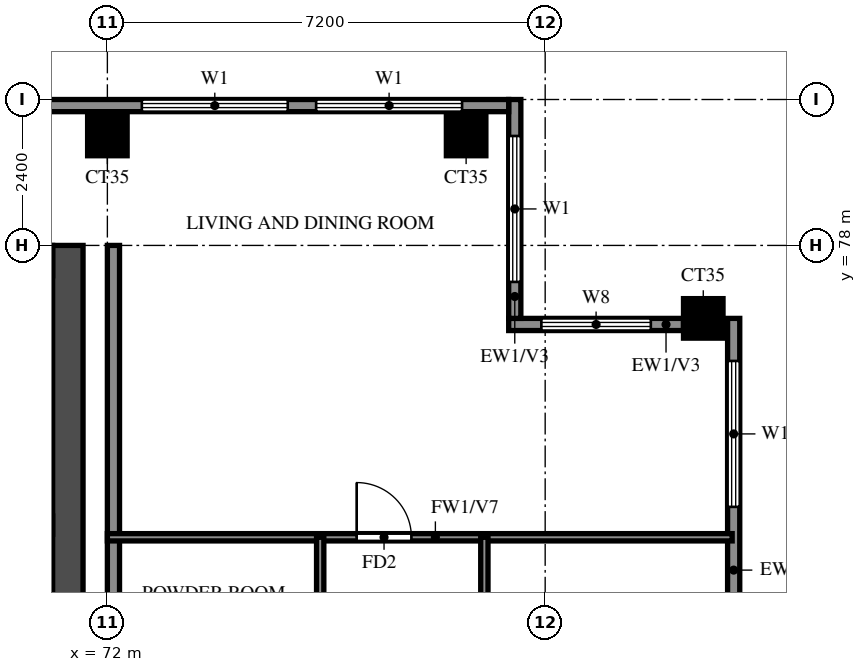
"""IFC4 building model, lengths in metres.
Left out: names, types, materials, properties, quantities, classifications, styles, units other than length and angle.
Written with IfcOpenShell. Run it as: python <this file> out.ifc"""

import sys

from ifc_helpers import new_model, si_unit, direction, frame, frame_2d, origin, origin_2d, place, context, subcontext, project, spatial, rectangle, extrude, source, transform, mapped, element, fill, save


model = new_model("IFC4")
c1 = context("Model", 3, precision=1e-05, world=origin(), true_north=direction((0.0, 1.0)))
c2 = subcontext(c1, "Body", "Model", "MODEL_VIEW")
j1 = project(units=[si_unit("LENGTHUNIT", "METRE"), si_unit("PLANEANGLEUNIT", "RADIAN")], contexts=[c1])
p1 = place(None, origin())
s1 = spatial("IfcSite", under=j1, at=p1, CompositionType="ELEMENT")
p2 = place(p1, origin())
s2 = spatial("IfcBuilding", under=s1, at=p2, CompositionType="ELEMENT")
p3 = place(p2, frame((0.0, 0.0, 250.0)))
s3 = spatial("IfcBuildingStorey", under=s2, at=p3, CompositionType="ELEMENT", Elevation=250.0)
m1 = source(origin(), c2, "Body", "SweptSolid", [
    extrude(rectangle(XDim=0.65, YDim=0.65, at=origin_2d()), origin(), (0.0, 0.0, 1.0), 3.22),
])
for number, where, z_axis, x_axis in (
    (1, (81.8, 76.8, 0.0), (0.0, 0.0, 1.0), (1.0, 0.0, 0.0)),
    (2, (72.0, 79.8, 0.0), (0.0, 0.0, 1.0), (1.0, 0.0, 0.0)),
    (3, (77.9, 79.8, 0.0), (0.0, 0.0, 1.0), (1.0, 0.0, 0.0)),
):
    element("IfcColumn", number, at=place(p3, frame(where, z_axis=z_axis, x_axis=x_axis)), inside=s3, PredefinedType="COLUMN", context=c2, shape_type="MappedRepresentation", body=[
        mapped(m1, transform((0.0, 0.0, 0.0))),
    ])
p4 = place(p3, frame((71.35, 66.15, 0.0), z_axis=(0.0, 0.0, 1.0), x_axis=(0.0, 1.0, 0.0)))
e4 = element("IfcWall", 4, at=p4, inside=s3, PredefinedType="SHEAR", context=c2, shape_type="SweptSolid", body=[
    extrude(rectangle(XDim=11.85, YDim=0.5, at=frame_2d((5.925, 0.0))), origin(), (0.0, 0.0, 1.0), 3.22),
])
p5 = place(p3, frame((29.7, 77.75, 0.0), z_axis=(0.0, 0.0, 1.0), x_axis=(1.0, 0.0, 0.0)))
e5 = element("IfcWall", 5, at=p5, inside=s3, PredefinedType="SHEAR", context=c2, shape_type="SweptSolid", body=[
    extrude(rectangle(XDim=41.4, YDim=0.5, at=frame_2d((20.7, 0.0))), origin(), (0.0, 0.0, 1.0), 3.22),
])
p6 = place(p3, frame((82.3, 69.6, 0.0), z_axis=(0.0, 0.0, 1.0), x_axis=(0.0, 1.0, 0.0)))
e6 = element("IfcWall", 6, at=p6, inside=s3, PredefinedType="SOLIDWALL", context=c2, shape_type="SweptSolid", body=[
    extrude(rectangle(XDim=7.2, YDim=0.2, at=frame_2d((3.6, 0.0))), origin(), (0.0, 0.0, 1.0), 3.22),
])
p7 = place(p6, frame((1.45, 0.0, 1.5)))
e7 = element("IfcOpeningElement", 7, at=p7, cuts=e6, PredefinedType="OPENING", context=c2, shape_type="SweptSolid", body=[
    extrude(rectangle(XDim=0.9, YDim=0.9, at=frame_2d((0.45, 0.45))), frame((0.0, 0.11, 0.0), z_axis=(0.0, -1.0, 0.0), x_axis=(1.0, 0.0, 0.0)), (0.0, 0.0, 1.0), 0.22),
])
p8 = place(p6, frame((4.1, 0.0, 0.6)))
e8 = element("IfcOpeningElement", 8, at=p8, cuts=e6, PredefinedType="OPENING", context=c2, shape_type="SweptSolid", body=[
    extrude(rectangle(XDim=2.4, YDim=2.4, at=frame_2d((1.2, 1.2))), frame((0.0, 0.11, 0.0), z_axis=(0.0, -1.0, 0.0), x_axis=(1.0, 0.0, 0.0)), (0.0, 0.0, 1.0), 0.22),
])
p9 = place(p3, frame((81.475, 76.7, 0.0), z_axis=(0.0, 0.0, 1.0), x_axis=(-1.0, 0.0, 0.0)))
e9 = element("IfcWall", 9, at=p9, inside=s3, PredefinedType="SOLIDWALL", context=c2, shape_type="SweptSolid", body=[
    extrude(rectangle(XDim=2.875, YDim=0.2, at=frame_2d((1.438, 0.0))), origin(), (0.0, 0.0, 1.0), 3.22),
])
p10 = place(p9, frame((0.538, 0.0, 0.6)))
e10 = element("IfcOpeningElement", 10, at=p10, cuts=e9, PredefinedType="OPENING", context=c2, shape_type="SweptSolid", body=[
    extrude(rectangle(XDim=1.8, YDim=2.4, at=frame_2d((0.9, 1.2))), frame((0.0, 0.11, 0.0), z_axis=(0.0, -1.0, 0.0), x_axis=(1.0, 0.0, 0.0)), (0.0, 0.0, 1.0), 0.22),
])
p11 = place(p3, frame((78.7, 76.8, 0.0), z_axis=(0.0, 0.0, 1.0), x_axis=(0.0, 1.0, 0.0)))
e11 = element("IfcWall", 11, at=p11, inside=s3, PredefinedType="SOLIDWALL", context=c2, shape_type="SweptSolid", body=[
    extrude(rectangle(XDim=3.6, YDim=0.2, at=frame_2d((1.8, 0.0))), origin(), (0.0, 0.0, 1.0), 3.22),
])
p12 = place(p11, frame((0.6, 0.0, 0.6)))
e12 = element("IfcOpeningElement", 12, at=p12, cuts=e11, PredefinedType="OPENING", context=c2, shape_type="SweptSolid", body=[
    extrude(rectangle(XDim=2.4, YDim=2.4, at=frame_2d((1.2, 1.2))), frame((0.0, 0.11, 0.0), z_axis=(0.0, -1.0, 0.0), x_axis=(1.0, 0.0, 0.0)), (0.0, 0.0, 1.0), 0.22),
])
p13 = place(p3, frame((78.6, 80.3, 0.0), z_axis=(0.0, 0.0, 1.0), x_axis=(-1.0, 0.0, 0.0)))
e13 = element("IfcWall", 13, at=p13, inside=s3, PredefinedType="SOLIDWALL", context=c2, shape_type="SweptSolid", body=[
    extrude(rectangle(XDim=56.6, YDim=0.2, at=frame_2d((28.3, 0.0))), origin(), (0.0, 0.0, 1.0), 3.22),
])
p14 = place(p13, frame((50.433, 0.0, 0.6)))
e14 = element("IfcOpeningElement", 14, at=p14, cuts=e13, PredefinedType="OPENING", context=c2, shape_type="SweptSolid", body=[
    extrude(rectangle(XDim=2.4, YDim=2.4, at=frame_2d((1.2, 1.2))), frame((0.0, 0.11, 0.0), z_axis=(0.0, -1.0, 0.0), x_axis=(1.0, 0.0, 0.0)), (0.0, 0.0, 1.0), 0.22),
])
p15 = place(p13, frame((53.367, 0.0, 0.6)))
e15 = element("IfcOpeningElement", 15, at=p15, cuts=e13, PredefinedType="OPENING", context=c2, shape_type="SweptSolid", body=[
    extrude(rectangle(XDim=2.4, YDim=2.4, at=frame_2d((1.2, 1.2))), frame((0.0, 0.11, 0.0), z_axis=(0.0, -1.0, 0.0), x_axis=(1.0, 0.0, 0.0)), (0.0, 0.0, 1.0), 0.22),
])
p16 = place(p13, frame((0.767, 0.0, 0.6)))
e16 = element("IfcOpeningElement", 16, at=p16, cuts=e13, PredefinedType="OPENING", context=c2, shape_type="SweptSolid", body=[
    extrude(rectangle(XDim=2.4, YDim=2.4, at=frame_2d((1.2, 1.2))), frame((0.0, 0.11, 0.0), z_axis=(0.0, -1.0, 0.0), x_axis=(1.0, 0.0, 0.0)), (0.0, 0.0, 1.0), 0.22),
])
p17 = place(p13, frame((3.633, 0.0, 0.6)))
e17 = element("IfcOpeningElement", 17, at=p17, cuts=e13, PredefinedType="OPENING", context=c2, shape_type="SweptSolid", body=[
    extrude(rectangle(XDim=2.4, YDim=2.4, at=frame_2d((1.2, 1.2))), frame((0.0, 0.11, 0.0), z_axis=(0.0, -1.0, 0.0), x_axis=(1.0, 0.0, 0.0)), (0.0, 0.0, 1.0), 0.22),
])
p18 = place(p3, frame((72.1, 62.4, 0.0), z_axis=(0.0, 0.0, 1.0), x_axis=(0.0, 1.0, 0.0)))
e18 = element("IfcWall", 18, at=p18, inside=s3, PredefinedType="SOLIDWALL", context=c2, shape_type="SweptSolid", body=[
    extrude(rectangle(XDim=15.6, YDim=0.2, at=frame_2d((7.8, 0.0))), origin(), (0.0, 0.0, 1.0), 3.22),
])
p19 = place(p3, frame((72.0, 73.2, 0.0), z_axis=(0.0, 0.0, 1.0), x_axis=(1.0, 0.0, 0.0)))
e19 = element("IfcWall", 19, at=p19, inside=s3, PredefinedType="PARTITIONING", context=c2, shape_type="SweptSolid", body=[
    extrude(rectangle(XDim=10.275, YDim=0.12, at=frame_2d((5.137, 0.0))), origin(), (0.0, 0.0, 1.0), 2.32),
])
p20 = place(p19, frame((4.1, 0.0, 0.0)))
e20 = element("IfcOpeningElement", 20, at=p20, cuts=e19, PredefinedType="OPENING", context=c2, shape_type="SweptSolid", body=[
    extrude(rectangle(XDim=0.9, YDim=2.1, at=frame_2d((0.45, 1.05))), frame((0.0, 0.07, 0.0), z_axis=(0.0, -1.0, 0.0), x_axis=(1.0, 0.0, 0.0)), (0.0, 0.0, 1.0), 0.14),
])
p21 = place(p3, frame((75.5, 61.2, 0.0), z_axis=(0.0, 0.0, 1.0), x_axis=(0.0, 1.0, 0.0)))
e21 = element("IfcWall", 21, at=p21, inside=s3, PredefinedType="PARTITIONING", context=c2, shape_type="SweptSolid", body=[
    extrude(rectangle(XDim=12.0, YDim=0.12, at=frame_2d((6.0, 0.0))), origin(), (0.0, 0.0, 1.0), 3.22),
])
p22 = place(p21, frame((5.3, 0.0, 0.0)))
e22 = element("IfcOpeningElement", 22, at=p22, cuts=e21, PredefinedType="OPENING", context=c2, shape_type="SweptSolid", body=[
    extrude(rectangle(XDim=0.9, YDim=2.1, at=frame_2d((0.45, 1.05))), frame((0.0, 0.07, 0.0), z_axis=(0.0, -1.0, 0.0), x_axis=(1.0, 0.0, 0.0)), (0.0, 0.0, 1.0), 0.14),
])
p23 = place(p21, frame((9.7, 0.0, 0.0)))
e23 = element("IfcOpeningElement", 23, at=p23, cuts=e21, PredefinedType="OPENING", context=c2, shape_type="SweptSolid", body=[
    extrude(rectangle(XDim=0.8, YDim=2.1, at=frame_2d((0.4, 1.05))), frame((0.0, 0.07, 0.0), z_axis=(0.0, -1.0, 0.0), x_axis=(1.0, 0.0, 0.0)), (0.0, 0.0, 1.0), 0.14),
])
p24 = place(p3, frame((78.2, 69.6, 0.0), z_axis=(0.0, 0.0, 1.0), x_axis=(0.0, 1.0, 0.0)))
e24 = element("IfcWall", 24, at=p24, inside=s3, PredefinedType="PARTITIONING", context=c2, shape_type="SweptSolid", body=[
    extrude(rectangle(XDim=3.6, YDim=0.12, at=frame_2d((1.8, 0.0))), origin(), (0.0, 0.0, 1.0), 3.22),
])
p25 = place(p8, origin())
e25 = element("IfcWindow", 25, at=p25, inside=s3, PartitioningType="DOUBLE_PANEL_VERTICAL", PredefinedType="WINDOW", context=c2, shape_type="SweptSolid", body=[
    extrude(rectangle(XDim=2.4, YDim=2.4, at=frame_2d((1.2, 1.2))), frame((0.0, 0.03, 0.0), z_axis=(0.0, -1.0, 0.0), x_axis=(1.0, 0.0, 0.0)), (0.0, 0.0, 1.0), 0.06),
])
fill(e8, e25)
p26 = place(p10, origin())
e26 = element("IfcWindow", 26, at=p26, inside=s3, PartitioningType="DOUBLE_PANEL_VERTICAL", PredefinedType="WINDOW", context=c2, shape_type="SweptSolid", body=[
    extrude(rectangle(XDim=1.8, YDim=2.4, at=frame_2d((0.9, 1.2))), frame((0.0, 0.03, 0.0), z_axis=(0.0, -1.0, 0.0), x_axis=(1.0, 0.0, 0.0)), (0.0, 0.0, 1.0), 0.06),
])
fill(e10, e26)
p27 = place(p12, origin())
e27 = element("IfcWindow", 27, at=p27, inside=s3, PartitioningType="DOUBLE_PANEL_VERTICAL", PredefinedType="WINDOW", context=c2, shape_type="SweptSolid", body=[
    extrude(rectangle(XDim=2.4, YDim=2.4, at=frame_2d((1.2, 1.2))), frame((0.0, 0.03, 0.0), z_axis=(0.0, -1.0, 0.0), x_axis=(1.0, 0.0, 0.0)), (0.0, 0.0, 1.0), 0.06),
])
fill(e12, e27)
p28 = place(p16, origin())
e28 = element("IfcWindow", 28, at=p28, inside=s3, PartitioningType="DOUBLE_PANEL_VERTICAL", PredefinedType="WINDOW", context=c2, shape_type="SweptSolid", body=[
    extrude(rectangle(XDim=2.4, YDim=2.4, at=frame_2d((1.2, 1.2))), frame((0.0, 0.03, 0.0), z_axis=(0.0, -1.0, 0.0), x_axis=(1.0, 0.0, 0.0)), (0.0, 0.0, 1.0), 0.06),
])
fill(e16, e28)
p29 = place(p17, origin())
e29 = element("IfcWindow", 29, at=p29, inside=s3, PartitioningType="DOUBLE_PANEL_VERTICAL", PredefinedType="WINDOW", context=c2, shape_type="SweptSolid", body=[
    extrude(rectangle(XDim=2.4, YDim=2.4, at=frame_2d((1.2, 1.2))), frame((0.0, 0.03, 0.0), z_axis=(0.0, -1.0, 0.0), x_axis=(1.0, 0.0, 0.0)), (0.0, 0.0, 1.0), 0.06),
])
fill(e17, e29)
p30 = place(p20, origin())
e30 = element("IfcDoor", 30, at=p30, inside=s3, OperationType="SINGLE_SWING_RIGHT", PredefinedType="DOOR", context=c2, shape_type="SweptSolid", body=[
    extrude(rectangle(XDim=0.9, YDim=2.1, at=frame_2d((0.45, 1.05))), frame((0.0, 0.025, 0.0), z_axis=(0.0, -1.0, 0.0), x_axis=(1.0, 0.0, 0.0)), (0.0, 0.0, 1.0), 0.05),
])
fill(e20, e30)
save(model, sys.argv[1])
